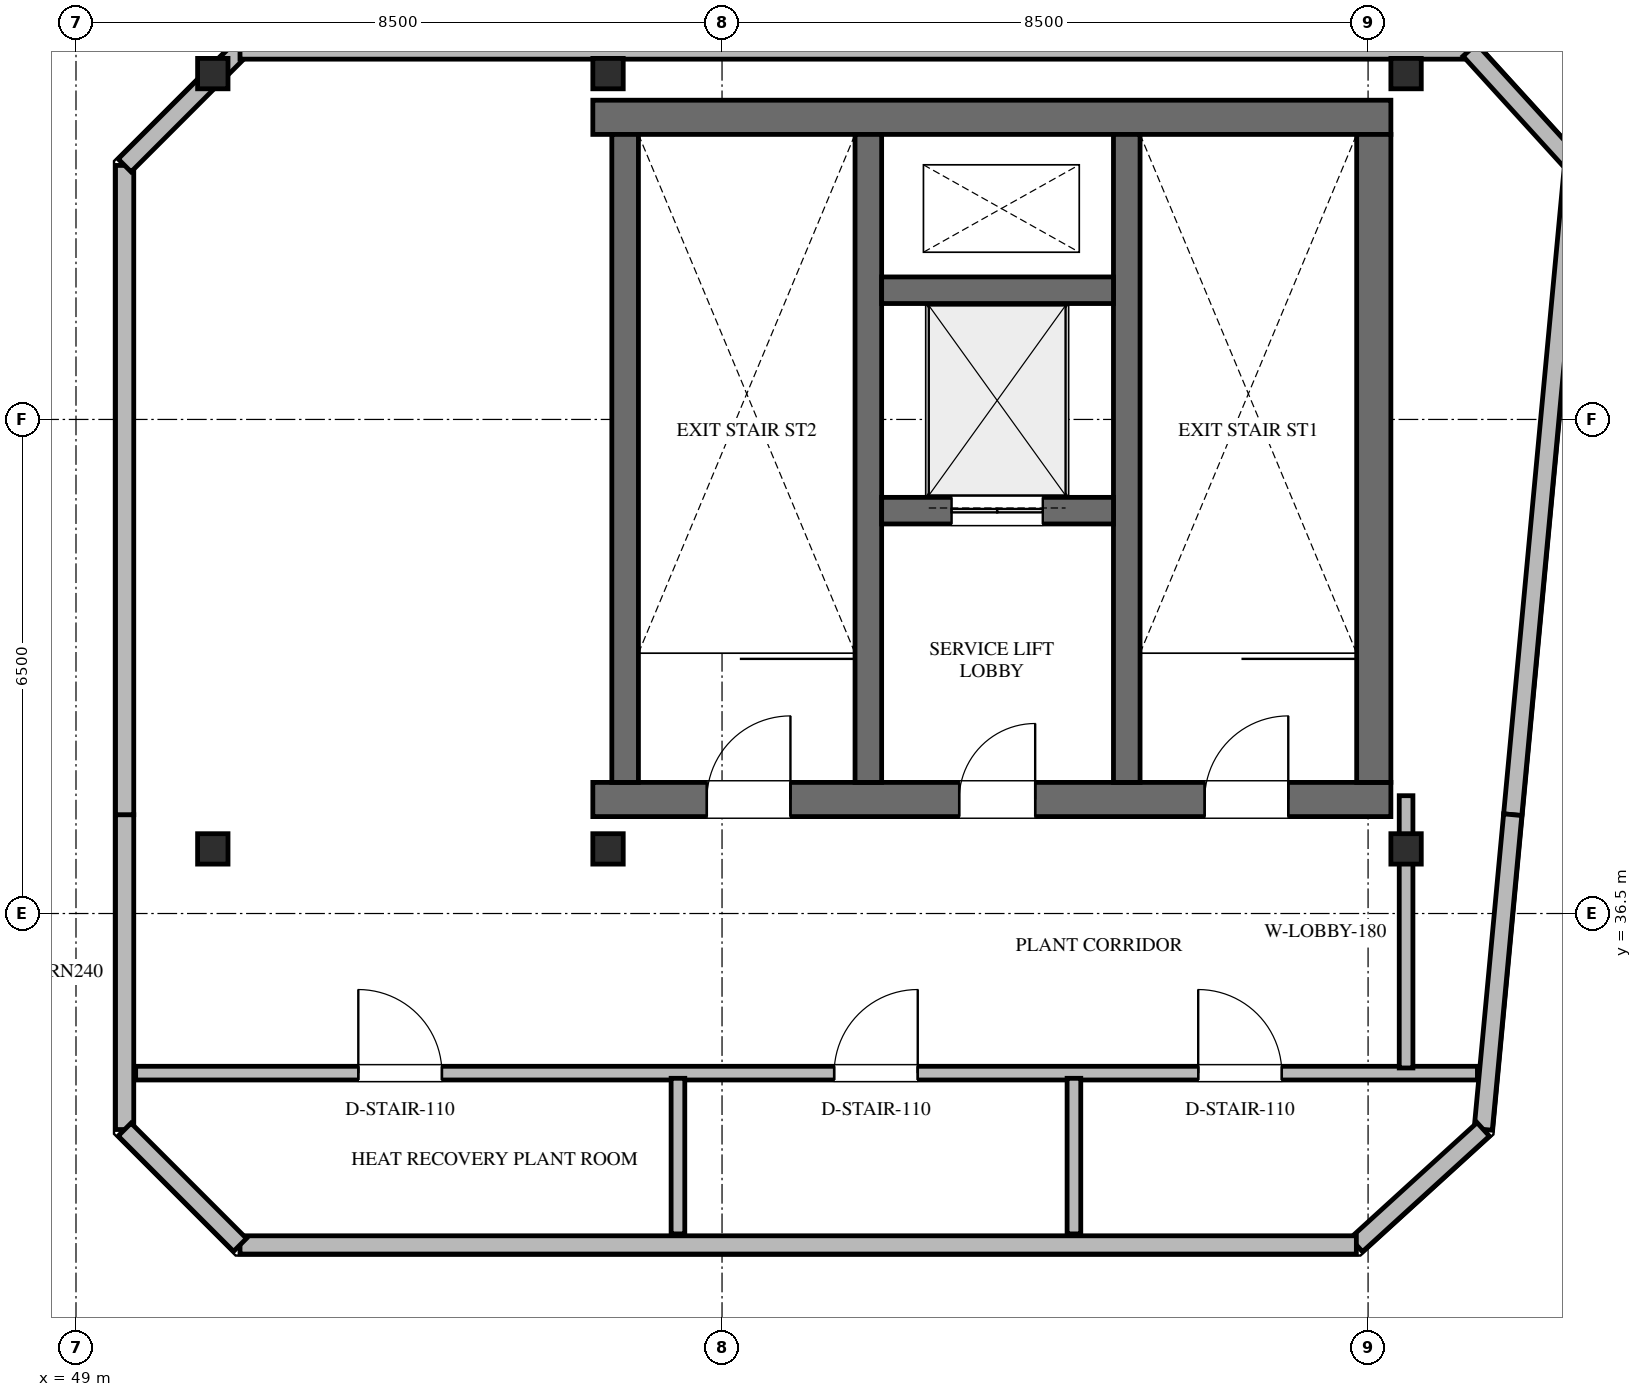
"""IFC4 building model, lengths in metres.
Left out: names, types, materials, properties, quantities, classifications, styles, units other than length and angle.
Written with IfcOpenShell. Run it as: python <this file> out.ifc"""

import sys

from ifc_helpers import new_model, si_unit, direction, frame, frame_2d, origin, origin_2d, place, context, subcontext, project, spatial, rectangle, hollow_rectangle, extrude, element, fill, save


model = new_model("IFC4")
c1 = context("Model", 3, precision=1e-05, world=origin(), true_north=direction((0.0, 1.0)))
c2 = subcontext(c1, "Body", "Model", "MODEL_VIEW")
j1 = project(units=[si_unit("LENGTHUNIT", "METRE"), si_unit("PLANEANGLEUNIT", "RADIAN")], contexts=[c1])
p1 = place(None, origin())
s1 = spatial("IfcSite", under=j1, at=p1, CompositionType="ELEMENT")
p2 = place(p1, origin())
s2 = spatial("IfcBuilding", under=s1, at=p2, CompositionType="ELEMENT")
p3 = place(p2, frame((0.0, 0.0, 333.6)))
s3 = spatial("IfcBuildingStorey", under=s2, at=p3, CompositionType="ELEMENT", Elevation=333.6)
p4 = place(p3, frame((55.8, 46.975, 0.0), z_axis=(0.0, 0.0, 1.0), x_axis=(1.0, 0.0, 0.0)))
e1 = element("IfcWall", 1, at=p4, inside=s3, PredefinedType="SHEAR", context=c2, shape_type="SweptSolid", body=[
    extrude(rectangle(XDim=10.5, YDim=0.45, at=frame_2d((5.25, 0.0))), origin(), (0.0, 0.0, 1.0), 3.6),
])
p5 = place(p3, frame((55.8, 38.0, 0.0), z_axis=(0.0, 0.0, 1.0), x_axis=(1.0, 0.0, 0.0)))
e2 = element("IfcWall", 2, at=p5, inside=s3, PredefinedType="SHEAR", context=c2, shape_type="SweptSolid", body=[
    extrude(rectangle(XDim=10.5, YDim=0.45, at=frame_2d((5.25, 0.0))), origin(), (0.0, 0.0, 1.0), 3.6),
])
p6 = place(p5, frame((1.5, 0.0, 0.0)))
e3 = element("IfcOpeningElement", 3, at=p6, cuts=e2, PredefinedType="OPENING", context=c2, shape_type="SweptSolid", body=[
    extrude(rectangle(XDim=1.1, YDim=2.2, at=frame_2d((0.55, 1.1))), frame((0.0, 0.235, 0.0), z_axis=(0.0, -1.0, 0.0), x_axis=(1.0, 0.0, 0.0)), (0.0, 0.0, 1.0), 0.47),
])
p7 = place(p5, frame((4.82, 0.0, 0.0)))
e4 = element("IfcOpeningElement", 4, at=p7, cuts=e2, PredefinedType="OPENING", context=c2, shape_type="SweptSolid", body=[
    extrude(rectangle(XDim=1.0, YDim=2.15, at=frame_2d((0.5, 1.075))), frame((0.0, 0.235, 0.0), z_axis=(0.0, -1.0, 0.0), x_axis=(1.0, 0.0, 0.0)), (0.0, 0.0, 1.0), 0.47),
])
p8 = place(p5, frame((8.05, 0.0, 0.0)))
e5 = element("IfcOpeningElement", 5, at=p8, cuts=e2, PredefinedType="OPENING", context=c2, shape_type="SweptSolid", body=[
    extrude(rectangle(XDim=1.1, YDim=2.2, at=frame_2d((0.55, 1.1))), frame((0.0, 0.235, 0.0), z_axis=(0.0, -1.0, 0.0), x_axis=(1.0, 0.0, 0.0)), (0.0, 0.0, 1.0), 0.47),
])
p9 = place(p3, frame((66.075, 38.225, 0.0), z_axis=(0.0, 0.0, 1.0), x_axis=(0.0, 1.0, 0.0)))
e6 = element("IfcWall", 6, at=p9, inside=s3, PredefinedType="SHEAR", context=c2, shape_type="SweptSolid", body=[
    extrude(rectangle(XDim=8.525, YDim=0.45, at=frame_2d((4.262, 0.0))), origin(), (0.0, 0.0, 1.0), 3.6),
])
for number, where, z_axis, x_axis in (
    (7, (62.825, 38.225, 0.0), (0.0, 0.0, 1.0), (0.0, 1.0, 0.0)),
    (8, (59.425, 38.225, 0.0), (0.0, 0.0, 1.0), (0.0, 1.0, 0.0)),
    (9, (56.225, 38.225, 0.0), (0.0, 0.0, 1.0), (0.0, 1.0, 0.0)),
):
    element("IfcWall", number, at=place(p3, frame(where, z_axis=z_axis, x_axis=x_axis)), inside=s3, PredefinedType="SHEAR", context=c2, shape_type="SweptSolid", body=[
        extrude(rectangle(XDim=8.525, YDim=0.35, at=frame_2d((4.262, 0.0))), origin(), (0.0, 0.0, 1.0), 3.6),
    ])
p10 = place(p3, frame((59.6, 41.8, 0.0), z_axis=(0.0, 0.0, 1.0), x_axis=(1.0, 0.0, 0.0)))
e10 = element("IfcWall", 10, at=p10, inside=s3, PredefinedType="SHEAR", context=c2, shape_type="SweptSolid", body=[
    extrude(rectangle(XDim=3.05, YDim=0.35, at=frame_2d((1.525, 0.0))), origin(), (0.0, 0.0, 1.0), 3.6),
])
p11 = place(p10, frame((0.92, 0.0, 0.0)))
e11 = element("IfcOpeningElement", 11, at=p11, cuts=e10, PredefinedType="OPENING", context=c2, shape_type="SweptSolid", body=[
    extrude(rectangle(XDim=1.2, YDim=2.2, at=frame_2d((0.6, 1.1))), frame((0.0, 0.185, 0.0), z_axis=(0.0, -1.0, 0.0), x_axis=(1.0, 0.0, 0.0)), (0.0, 0.0, 1.0), 0.37),
])
p12 = place(p3, frame((59.6, 44.7, 0.0), z_axis=(0.0, 0.0, 1.0), x_axis=(1.0, 0.0, 0.0)))
e12 = element("IfcWall", 12, at=p12, inside=s3, PredefinedType="SHEAR", context=c2, shape_type="SweptSolid", body=[
    extrude(rectangle(XDim=3.05, YDim=0.35, at=frame_2d((1.525, 0.0))), origin(), (0.0, 0.0, 1.0), 3.6),
])
for number, where, z_axis, x_axis in (
    (13, (66.5, 47.55, 0.0), (0.0, 0.0, 1.0), (1.0, 0.0, 0.0)),
    (14, (56.0, 47.55, 0.0), (0.0, 0.0, 1.0), (1.0, 0.0, 0.0)),
    (15, (66.5, 37.35, 0.0), (0.0, 0.0, 1.0), (1.0, 0.0, 0.0)),
    (16, (56.0, 37.35, 0.0), (0.0, 0.0, 1.0), (1.0, 0.0, 0.0)),
    (17, (50.8, 47.55, 0.0), (0.0, 0.0, 1.0), (1.0, 0.0, 0.0)),
    (18, (50.8, 37.35, 0.0), (0.0, 0.0, 1.0), (1.0, 0.0, 0.0)),
):
    element("IfcColumn", number, at=place(p3, frame(where, z_axis=z_axis, x_axis=x_axis)), inside=s3, PredefinedType="COLUMN", context=c2, shape_type="SweptSolid", body=[
        extrude(hollow_rectangle(XDim=0.4, YDim=0.4, WallThickness=0.016, at=origin_2d()), origin(), (0.0, 0.0, 1.0), 3.315),
    ])
p13 = place(p3, frame((49.64, 33.658, 0.0), z_axis=(0.0, 0.0, 1.0), x_axis=(0.0, 1.0, 0.0)))
e19 = element("IfcWall", 19, at=p13, inside=s3, PredefinedType="STANDARD", context=c2, shape_type="SweptSolid", body=[
    extrude(rectangle(XDim=4.142, YDim=0.24, at=frame_2d((2.071, 0.0))), origin(), (0.0, 0.0, 1.0), 3.34),
])
p14 = place(p3, frame((49.64, 37.8, 0.0), z_axis=(0.0, 0.0, 1.0), x_axis=(0.0, 1.0, 0.0)))
e20 = element("IfcWall", 20, at=p14, inside=s3, PredefinedType="STANDARD", context=c2, shape_type="SweptSolid", body=[
    extrude(rectangle(XDim=8.542, YDim=0.24, at=frame_2d((4.271, 0.0))), origin(), (0.0, 0.0, 1.0), 3.34),
])
p15 = place(p3, frame((49.64, 46.342, 0.0), z_axis=(0.0, 0.0, 1.0), x_axis=(0.707106781187, 0.707106781187, 0.0)))
e21 = element("IfcWall", 21, at=p15, inside=s3, PredefinedType="STANDARD", context=c2, shape_type="SweptSolid", body=[
    extrude(rectangle(XDim=2.147, YDim=0.24, at=frame_2d((1.073, 0.0))), origin(), (0.0, 0.0, 1.0), 2.729),
])
p16 = place(p3, frame((51.158, 47.86, 0.0), z_axis=(0.0, 0.0, 1.0), x_axis=(1.0, 0.0, 0.0)))
e22 = element("IfcWall", 22, at=p16, inside=s3, PredefinedType="STANDARD", context=c2, shape_type="SweptSolid", body=[
    extrude(rectangle(XDim=16.18, YDim=0.24, at=frame_2d((8.09, 0.0))), origin(), (0.0, 0.0, 1.0), 3.34),
])
p17 = place(p3, frame((67.338, 47.86, 0.0), z_axis=(0.0, 0.0, 1.0), x_axis=(0.673276865928, -0.739390466402, 0.0)))
e23 = element("IfcWall", 23, at=p17, inside=s3, PredefinedType="STANDARD", context=c2, shape_type="SweptSolid", body=[
    extrude(rectangle(XDim=2.031, YDim=0.24, at=frame_2d((1.016, 0.0))), origin(), (0.0, 0.0, 1.0), 3.34),
])
p18 = place(p3, frame((68.706, 46.358, 0.0), z_axis=(0.0, 0.0, 1.0), x_axis=(-0.093357425452, -0.995632658722, 0.0)))
e24 = element("IfcWall", 24, at=p18, inside=s3, PredefinedType="STANDARD", context=c2, shape_type="SweptSolid", body=[
    extrude(rectangle(XDim=8.596, YDim=0.24, at=frame_2d((4.298, 0.0))), origin(), (0.0, 0.0, 1.0), 3.34),
])
p19 = place(p3, frame((67.903, 37.8, 0.0), z_axis=(0.0, 0.0, 1.0), x_axis=(-0.093351621222, -0.995633202949, 0.0)))
e25 = element("IfcWall", 25, at=p19, inside=s3, PredefinedType="STANDARD", context=c2, shape_type="SweptSolid", body=[
    extrude(rectangle(XDim=4.158, YDim=0.24, at=frame_2d((2.079, 0.0))), origin(), (0.0, 0.0, 1.0), 3.34),
])
p20 = place(p3, frame((67.515, 33.66, 0.0), z_axis=(0.0, 0.0, 1.0), x_axis=(-0.739372182695, -0.673296944488, 0.0)))
e26 = element("IfcWall", 26, at=p20, inside=s3, PredefinedType="STANDARD", context=c2, shape_type="SweptSolid", body=[
    extrude(rectangle(XDim=2.258, YDim=0.24, at=frame_2d((1.129, 0.0))), origin(), (0.0, 0.0, 1.0), 3.34),
])
p21 = place(p3, frame((65.846, 32.14, 0.0), z_axis=(0.0, 0.0, 1.0), x_axis=(-1.0, 0.0, 0.0)))
e27 = element("IfcWall", 27, at=p21, inside=s3, PredefinedType="STANDARD", context=c2, shape_type="SweptSolid", body=[
    extrude(rectangle(XDim=14.688, YDim=0.24, at=frame_2d((7.344, 0.0))), origin(), (0.0, 0.0, 1.0), 3.34),
])
p22 = place(p3, frame((51.158, 32.14, 0.0), z_axis=(0.0, 0.0, 1.0), x_axis=(-0.707106781187, 0.707106781187, 0.0)))
e28 = element("IfcWall", 28, at=p22, inside=s3, PredefinedType="STANDARD", context=c2, shape_type="SweptSolid", body=[
    extrude(rectangle(XDim=2.147, YDim=0.24, at=frame_2d((1.073, 0.0))), origin(), (0.0, 0.0, 1.0), 3.34),
])
p23 = place(p3, frame((49.785, 34.4, 0.0), z_axis=(0.0, 0.0, 1.0), x_axis=(1.0, 0.0, 0.0)))
e29 = element("IfcWall", 29, at=p23, inside=s3, PredefinedType="STANDARD", context=c2, shape_type="SweptSolid", body=[
    extrude(rectangle(XDim=17.654, YDim=0.18, at=frame_2d((8.827, 0.0))), origin(), (0.0, 0.0, 1.0), 3.34),
])
p24 = place(p23, frame((2.929, 0.0, 0.0)))
e30 = element("IfcOpeningElement", 30, at=p24, cuts=e29, PredefinedType="OPENING", context=c2, shape_type="SweptSolid", body=[
    extrude(rectangle(XDim=1.1, YDim=2.2, at=frame_2d((0.55, 1.1))), frame((0.0, 0.1, 0.0), z_axis=(0.0, -1.0, 0.0), x_axis=(1.0, 0.0, 0.0)), (0.0, 0.0, 1.0), 0.2),
])
p25 = place(p23, frame((9.19, 0.0, 0.0)))
e31 = element("IfcOpeningElement", 31, at=p25, cuts=e29, PredefinedType="OPENING", context=c2, shape_type="SweptSolid", body=[
    extrude(rectangle(XDim=1.1, YDim=2.2, at=frame_2d((0.55, 1.1))), frame((0.0, 0.1, 0.0), z_axis=(0.0, -1.0, 0.0), x_axis=(1.0, 0.0, 0.0)), (0.0, 0.0, 1.0), 0.2),
])
p26 = place(p23, frame((13.98, 0.0, 0.0)))
e32 = element("IfcOpeningElement", 32, at=p26, cuts=e29, PredefinedType="OPENING", context=c2, shape_type="SweptSolid", body=[
    extrude(rectangle(XDim=1.1, YDim=2.2, at=frame_2d((0.55, 1.1))), frame((0.0, 0.1, 0.0), z_axis=(0.0, -1.0, 0.0), x_axis=(1.0, 0.0, 0.0)), (0.0, 0.0, 1.0), 0.2),
])
p27 = place(p3, frame((66.5, 34.468, 0.0), z_axis=(0.0, 0.0, 1.0), x_axis=(0.0, 1.0, 0.0)))
e33 = element("IfcWall", 33, at=p27, inside=s3, PredefinedType="STANDARD", context=c2, shape_type="SweptSolid", body=[
    extrude(rectangle(XDim=3.582, YDim=0.18, at=frame_2d((1.791, 0.0))), origin(), (0.0, 0.0, 1.0), 2.729),
])
for number, where, z_axis, x_axis in (
    (34, (56.92, 32.285, 0.0), (0.0, 0.0, 1.0), (0.0, 1.0, 0.0)),
    (35, (62.13, 32.285, 0.0), (0.0, 0.0, 1.0), (0.0, 1.0, 0.0)),
):
    element("IfcWall", number, at=place(p3, frame(where, z_axis=z_axis, x_axis=x_axis)), inside=s3, PredefinedType="STANDARD", context=c2, shape_type="SweptSolid", body=[
        extrude(rectangle(XDim=2.047, YDim=0.18, at=frame_2d((1.023, 0.0))), origin(), (0.0, 0.0, 1.0), 3.34),
    ])
p28 = place(p6, origin())
e36 = element("IfcDoor", 36, at=p28, inside=s3, OperationType="SINGLE_SWING_RIGHT", PredefinedType="DOOR", context=c2, shape_type="SweptSolid", body=[
    extrude(rectangle(XDim=1.1, YDim=2.2, at=frame_2d((0.55, 1.1))), frame((0.0, 0.025, 0.0), z_axis=(0.0, -1.0, 0.0), x_axis=(1.0, 0.0, 0.0)), (0.0, 0.0, 1.0), 0.05),
])
fill(e3, e36)
p29 = place(p7, origin())
e37 = element("IfcDoor", 37, at=p29, inside=s3, OperationType="SINGLE_SWING_RIGHT", PredefinedType="DOOR", context=c2, shape_type="SweptSolid", body=[
    extrude(rectangle(XDim=1.0, YDim=2.15, at=frame_2d((0.5, 1.075))), frame((0.0, 0.025, 0.0), z_axis=(0.0, -1.0, 0.0), x_axis=(1.0, 0.0, 0.0)), (0.0, 0.0, 1.0), 0.05),
])
fill(e4, e37)
p30 = place(p8, origin())
e38 = element("IfcDoor", 38, at=p30, inside=s3, OperationType="SINGLE_SWING_RIGHT", PredefinedType="DOOR", context=c2, shape_type="SweptSolid", body=[
    extrude(rectangle(XDim=1.1, YDim=2.2, at=frame_2d((0.55, 1.1))), frame((0.0, 0.025, 0.0), z_axis=(0.0, -1.0, 0.0), x_axis=(1.0, 0.0, 0.0)), (0.0, 0.0, 1.0), 0.05),
])
fill(e5, e38)
p31 = place(p11, origin())
e39 = element("IfcDoor", 39, at=p31, inside=s3, OperationType="DOUBLE_DOOR_SLIDING", PredefinedType="DOOR", context=c2, shape_type="SweptSolid", body=[
    extrude(rectangle(XDim=1.2, YDim=2.2, at=frame_2d((0.6, 1.1))), frame((0.0, 0.025, 0.0), z_axis=(0.0, -1.0, 0.0), x_axis=(1.0, 0.0, 0.0)), (0.0, 0.0, 1.0), 0.05),
])
fill(e11, e39)
p32 = place(p24, origin())
e40 = element("IfcDoor", 40, at=p32, inside=s3, OperationType="SINGLE_SWING_LEFT", PredefinedType="DOOR", context=c2, shape_type="SweptSolid", body=[
    extrude(rectangle(XDim=1.1, YDim=2.2, at=frame_2d((0.55, 1.1))), frame((0.0, 0.025, 0.0), z_axis=(0.0, -1.0, 0.0), x_axis=(1.0, 0.0, 0.0)), (0.0, 0.0, 1.0), 0.05),
])
fill(e30, e40)
p33 = place(p25, origin())
e41 = element("IfcDoor", 41, at=p33, inside=s3, OperationType="SINGLE_SWING_RIGHT", PredefinedType="DOOR", context=c2, shape_type="SweptSolid", body=[
    extrude(rectangle(XDim=1.1, YDim=2.2, at=frame_2d((0.55, 1.1))), frame((0.0, 0.025, 0.0), z_axis=(0.0, -1.0, 0.0), x_axis=(1.0, 0.0, 0.0)), (0.0, 0.0, 1.0), 0.05),
])
fill(e31, e41)
p34 = place(p26, origin())
e42 = element("IfcDoor", 42, at=p34, inside=s3, OperationType="SINGLE_SWING_LEFT", PredefinedType="DOOR", context=c2, shape_type="SweptSolid", body=[
    extrude(rectangle(XDim=1.1, YDim=2.2, at=frame_2d((0.55, 1.1))), frame((0.0, 0.025, 0.0), z_axis=(0.0, -1.0, 0.0), x_axis=(1.0, 0.0, 0.0)), (0.0, 0.0, 1.0), 0.05),
])
fill(e32, e42)
save(model, sys.argv[1])
